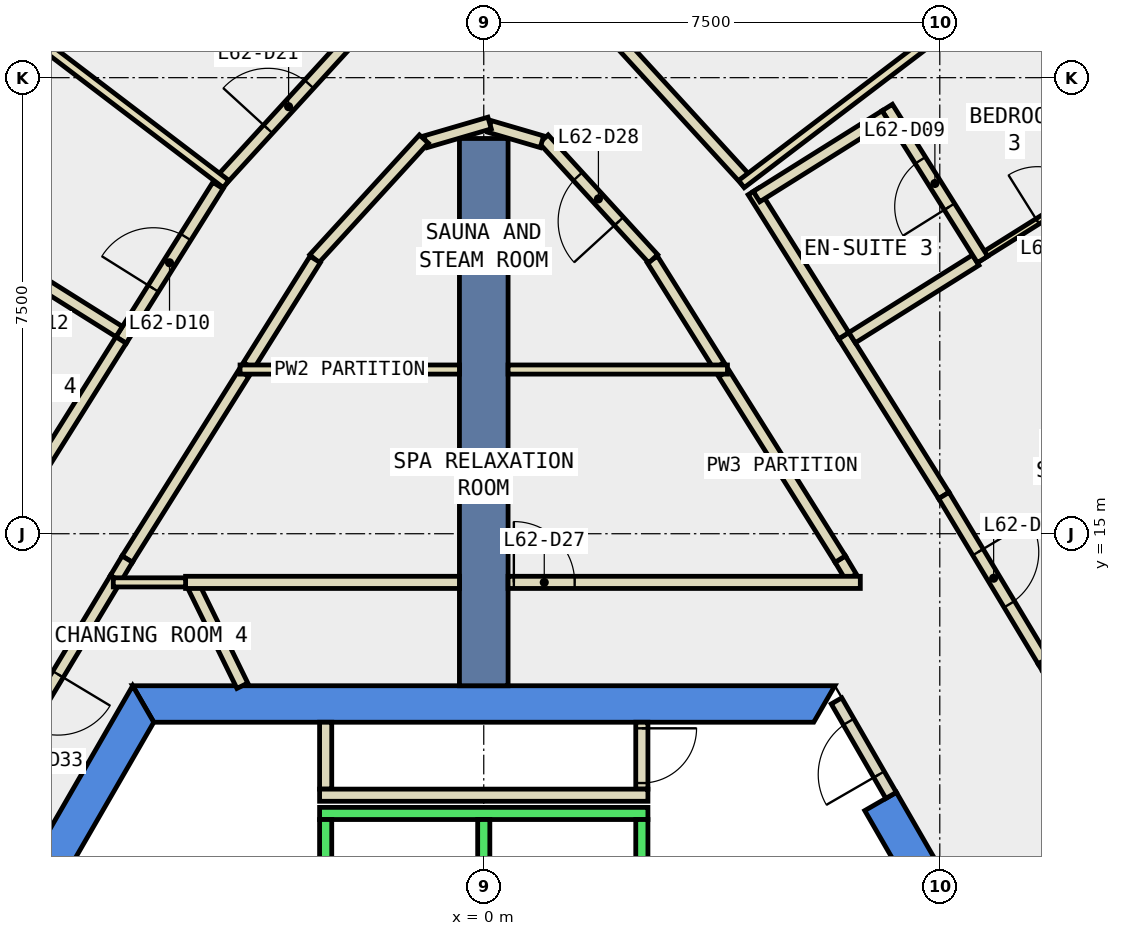
"""IFC4 building model, lengths in metres.
Left out: names, types, materials, properties, quantities, classifications, styles, units other than length and angle.
Written with IfcOpenShell. Run it as: python <this file> out.ifc"""

import sys

from ifc_helpers import new_model, si_unit, direction, frame, frame_2d, origin, place, context, subcontext, project, spatial, polyline, rectangle, outline, extrude, element, fill, save


model = new_model("IFC4")
c1 = context("Model", 3, precision=1e-05, world=origin(), true_north=direction((0.0, 1.0)))
c2 = subcontext(c1, "Body", "Model", "MODEL_VIEW")
j1 = project(units=[si_unit("LENGTHUNIT", "METRE"), si_unit("PLANEANGLEUNIT", "RADIAN")], contexts=[c1])
p1 = place(None, origin())
s1 = spatial("IfcSite", under=j1, at=p1, CompositionType="ELEMENT")
p2 = place(p1, origin())
s2 = spatial("IfcBuilding", under=s1, at=p2, CompositionType="ELEMENT")
p3 = place(p2, frame((0.0, 0.0, 270.2)))
s3 = spatial("IfcBuildingStorey", under=s2, at=p3, CompositionType="ELEMENT", Elevation=270.2)
p4 = place(p3, frame((0.0, 0.0, -0.34)))
e1 = element("IfcWall", 1, at=p4, inside=s3, PredefinedType="SHEAR", context=c2, shape_type="SweptSolid", body=[
    extrude(outline(polyline([(6.786, 10.747), (6.266, 10.447), (10.854, 2.5), (11.547, 2.5), (6.786, 10.747)])), origin(), (0.0, 0.0, 1.0), 3.6),
])
p5 = place(p3, frame((0.0, 0.0, -0.34)))
e2 = element("IfcWall", 2, at=p5, inside=s3, PredefinedType="SHEAR", context=c2, shape_type="SweptSolid", body=[
    extrude(outline(polyline([(5.774, 12.5), (-5.774, 12.5), (-5.427, 11.9), (5.427, 11.9), (5.774, 12.5)])), origin(), (0.0, 0.0, 1.0), 3.6),
])
p6 = place(p3, frame((0.0, 0.0, -0.34)))
e3 = element("IfcWall", 3, at=p6, inside=s3, PredefinedType="SHEAR", context=c2, shape_type="SweptSolid", body=[
    extrude(outline(polyline([(-10.535, 4.253), (-10.015, 3.953), (-5.427, 11.9), (-5.774, 12.5), (-10.535, 4.253)])), origin(), (0.0, 0.0, 1.0), 3.6),
])
p7 = place(p3, frame((0.0, 12.5, -0.34), z_axis=(0.0, 0.0, 1.0), x_axis=(0.0, 1.0, 0.0)))
e4 = element("IfcWall", 4, at=p7, inside=s3, PredefinedType="SHEAR", context=c2, shape_type="SweptSolid", body=[
    extrude(rectangle(XDim=9.0, YDim=0.8, at=frame_2d((4.5, 0.0))), origin(), (0.0, 0.0, 1.0), 3.6),
])
p8 = place(p3, frame((-3.97, 12.5, 0.0), z_axis=(0.0, 0.0, 1.0), x_axis=(-0.440355460167, 0.89782351757, 0.0)))
e5 = element("IfcWall", 5, at=p8, inside=s3, PredefinedType="PARTITIONING", context=c2, shape_type="SweptSolid", body=[
    extrude(rectangle(XDim=1.869, YDim=0.2, at=frame_2d((0.935, 0.0))), origin(), (0.0, 0.0, 1.0), 3.26),
])
p9 = place(p3, frame((-6.054, 14.264, 0.0), z_axis=(0.0, 0.0, 1.0), x_axis=(-0.515508653897, -0.856884372455, 0.0)))
e6 = element("IfcWall", 6, at=p9, inside=s3, PredefinedType="PARTITIONING", context=c2, shape_type="SweptSolid", body=[
    extrude(rectangle(XDim=4.677, YDim=0.2, at=frame_2d((2.339, 0.0))), origin(), (0.0, 0.0, 1.0), 3.26),
])
p10 = place(p9, frame((1.839, 0.0, 0.0)))
e7 = element("IfcOpeningElement", 7, at=p10, cuts=e6, PredefinedType="OPENING", context=c2, shape_type="SweptSolid", body=[
    extrude(rectangle(XDim=1.0, YDim=2.1, at=frame_2d((0.5, 1.05))), frame((0.0, 0.11, 0.0), z_axis=(0.0, -1.0, 0.0), x_axis=(1.0, 0.0, 0.0)), (0.0, 0.0, 1.0), 0.22),
])
p11 = place(p3, frame((-4.904, 14.2, 0.0), z_axis=(0.0, 0.0, 1.0), x_axis=(1.0, 0.0, 0.0)))
e8 = element("IfcWall", 8, at=p11, inside=s3, PredefinedType="PARTITIONING", context=c2, shape_type="SweptSolid", body=[
    extrude(rectangle(XDim=4.504, YDim=0.2, at=frame_2d((2.252, 0.0))), origin(), (0.0, 0.0, 1.0), 3.26),
])
p12 = place(p3, frame((6.041, 14.286, 0.0), z_axis=(0.0, 0.0, 1.0), x_axis=(-0.513873647624, 0.857865883619, 0.0)))
e9 = element("IfcWall", 9, at=p12, inside=s3, PredefinedType="PARTITIONING", context=c2, shape_type="SweptSolid", body=[
    extrude(rectangle(XDim=0.346, YDim=0.2, at=frame_2d((0.173, 0.0))), origin(), (0.0, 0.0, 1.0), 3.26),
])
for number, where, z_axis, x_axis in (
    (10, (5.863, 14.583, 0.0), (0.0, 0.0, 1.0), (-0.531, 0.847, 0.0)),
    (11, (-3.948, 17.636, 0.0), (0.0, 0.0, 1.0), (-0.531, -0.847, 0.0)),
):
    element("IfcWall", number, at=place(p3, frame(where, z_axis=z_axis, x_axis=x_axis)), inside=s3, PredefinedType="PARTITIONING", context=c2, shape_type="SweptSolid", body=[
        extrude(rectangle(XDim=3.604, YDim=0.2, at=frame_2d((1.802, 0.0))), origin(), (0.0, 0.0, 1.0), 3.26),
    ])
p13 = place(p3, frame((-5.863, 14.583, 0.0), z_axis=(0.0, 0.0, 1.0), x_axis=(-0.513433271491, -0.858129521533, 0.0)))
e12 = element("IfcWall", 12, at=p13, inside=s3, PredefinedType="PARTITIONING", context=c2, shape_type="SweptSolid", body=[
    extrude(rectangle(XDim=0.372, YDim=0.2, at=frame_2d((0.186, 0.0))), origin(), (0.0, 0.0, 1.0), 3.26),
])
p14 = place(p3, frame((3.868, 17.764, 0.0), z_axis=(0.0, 0.0, 1.0), x_axis=(-0.531062870102, 0.847332418829, 0.0)))
e13 = element("IfcWall", 13, at=p14, inside=s3, PredefinedType="PARTITIONING", context=c2, shape_type="SweptSolid", body=[
    extrude(rectangle(XDim=2.062, YDim=0.2, at=frame_2d((1.031, 0.0))), origin(), (0.0, 0.0, 1.0), 3.26),
])
p15 = place(p3, frame((2.787, 19.522, 0.0), z_axis=(0.0, 0.0, 1.0), x_axis=(-0.675132105979, 0.73769684795, 0.0)))
e14 = element("IfcWall", 14, at=p15, inside=s3, PredefinedType="PARTITIONING", context=c2, shape_type="SweptSolid", body=[
    extrude(rectangle(XDim=2.669, YDim=0.2, at=frame_2d((1.334, 0.0))), origin(), (0.0, 0.0, 1.0), 3.26),
])
p16 = place(p15, frame((0.835, 0.0, 0.0)))
e15 = element("IfcOpeningElement", 15, at=p16, cuts=e14, PredefinedType="OPENING", context=c2, shape_type="SweptSolid", body=[
    extrude(rectangle(XDim=1.0, YDim=2.1, at=frame_2d((0.5, 1.05))), frame((0.0, 0.11, 0.0), z_axis=(0.0, -1.0, 0.0), x_axis=(1.0, 0.0, 0.0)), (0.0, 0.0, 1.0), 0.22),
])
p17 = place(p3, frame((0.957, 21.446, 0.0), z_axis=(0.0, 0.0, 1.0), x_axis=(-0.959758875404, 0.28082539252, 0.0)))
e16 = element("IfcWall", 16, at=p17, inside=s3, PredefinedType="PARTITIONING", context=c2, shape_type="SweptSolid", body=[
    extrude(rectangle(XDim=0.897, YDim=0.2, at=frame_2d((0.449, 0.0))), origin(), (0.0, 0.0, 1.0), 3.26),
])
p18 = place(p3, frame((0.096, 21.754, 0.0), z_axis=(0.0, 0.0, 1.0), x_axis=(-0.959817848073, -0.280623766849, 0.0)))
e17 = element("IfcWall", 17, at=p18, inside=s3, PredefinedType="PARTITIONING", context=c2, shape_type="SweptSolid", body=[
    extrude(rectangle(XDim=1.097, YDim=0.2, at=frame_2d((0.549, 0.0))), origin(), (0.0, 0.0, 1.0), 3.26),
])
p19 = place(p3, frame((-0.985, 21.491, 0.0), z_axis=(0.0, 0.0, 1.0), x_axis=(-0.675132105979, -0.73769684795, 0.0)))
e18 = element("IfcWall", 18, at=p19, inside=s3, PredefinedType="PARTITIONING", context=c2, shape_type="SweptSolid", body=[
    extrude(rectangle(XDim=2.669, YDim=0.2, at=frame_2d((1.334, 0.0))), origin(), (0.0, 0.0, 1.0), 3.26),
])
p20 = place(p3, frame((-2.773, 19.511, 0.0), z_axis=(0.0, 0.0, 1.0), x_axis=(-0.531062870102, -0.847332418829, 0.0)))
e19 = element("IfcWall", 19, at=p20, inside=s3, PredefinedType="PARTITIONING", context=c2, shape_type="SweptSolid", body=[
    extrude(rectangle(XDim=2.062, YDim=0.2, at=frame_2d((1.031, 0.0))), origin(), (0.0, 0.0, 1.0), 3.26),
])
p21 = place(p3, frame((5.92, 18.256, 0.0), z_axis=(0.0, 0.0, 1.0), x_axis=(0.531152062518, -0.84727651123, 0.0)))
e20 = element("IfcWall", 20, at=p21, inside=s3, PredefinedType="PARTITIONING", context=c2, shape_type="SweptSolid", body=[
    extrude(rectangle(XDim=3.101, YDim=0.2, at=frame_2d((1.55, 0.0))), origin(), (0.0, 0.0, 1.0), 3.26),
])
p22 = place(p3, frame((7.567, 15.629, 0.0), z_axis=(0.0, 0.0, 1.0), x_axis=(0.51556943596, -0.856847802532, 0.0)))
e21 = element("IfcWall", 21, at=p22, inside=s3, PredefinedType="PARTITIONING", context=c2, shape_type="SweptSolid", body=[
    extrude(rectangle(XDim=3.176, YDim=0.2, at=frame_2d((1.588, 0.0))), origin(), (0.0, 0.0, 1.0), 3.26),
])
p23 = place(p22, frame((1.088, 0.0, 0.0)))
e22 = element("IfcOpeningElement", 22, at=p23, cuts=e21, PredefinedType="OPENING", context=c2, shape_type="SweptSolid", body=[
    extrude(rectangle(XDim=1.0, YDim=2.1, at=frame_2d((0.5, 1.05))), frame((0.0, 0.11, 0.0), z_axis=(0.0, -1.0, 0.0), x_axis=(1.0, 0.0, 0.0)), (0.0, 0.0, 1.0), 0.22),
])
p24 = place(p3, frame((4.433, 20.628, 0.0), z_axis=(0.0, 0.0, 1.0), x_axis=(0.531135189756, -0.84728708842, 0.0)))
e23 = element("IfcWall", 23, at=p24, inside=s3, PredefinedType="PARTITIONING", context=c2, shape_type="SweptSolid", body=[
    extrude(rectangle(XDim=2.799, YDim=0.2, at=frame_2d((1.4, 0.0))), origin(), (0.0, 0.0, 1.0), 3.26),
])
p25 = place(p3, frame((-4.335, 20.793, 0.0), z_axis=(0.0, 0.0, 1.0), x_axis=(0.675074517272, 0.737749548377, 0.0)))
e24 = element("IfcWall", 24, at=p25, inside=s3, PredefinedType="PARTITIONING", context=c2, shape_type="SweptSolid", body=[
    extrude(rectangle(XDim=3.334, YDim=0.2, at=frame_2d((1.667, 0.0))), origin(), (0.0, 0.0, 1.0), 3.26),
])
p26 = place(p25, frame((1.167, 0.0, 0.0)))
e25 = element("IfcOpeningElement", 25, at=p26, cuts=e24, PredefinedType="OPENING", context=c2, shape_type="SweptSolid", body=[
    extrude(rectangle(XDim=1.0, YDim=2.1, at=frame_2d((0.5, 1.05))), frame((0.0, 0.11, 0.0), z_axis=(0.0, -1.0, 0.0), x_axis=(1.0, 0.0, 0.0)), (0.0, 0.0, 1.0), 0.22),
])
p27 = place(p3, frame((2.084, 23.253, 0.0), z_axis=(0.0, 0.0, 1.0), x_axis=(0.675074517272, -0.737749548377, 0.0)))
e26 = element("IfcWall", 26, at=p27, inside=s3, PredefinedType="PARTITIONING", context=c2, shape_type="SweptSolid", body=[
    extrude(rectangle(XDim=3.334, YDim=0.2, at=frame_2d((1.667, 0.0))), origin(), (0.0, 0.0, 1.0), 3.26),
])
p28 = place(p3, frame((-5.965, 18.185, 0.0), z_axis=(0.0, 0.0, 1.0), x_axis=(0.531256372055, 0.847211111324, 0.0)))
e27 = element("IfcWall", 27, at=p28, inside=s3, PredefinedType="PARTITIONING", context=c2, shape_type="SweptSolid", body=[
    extrude(rectangle(XDim=3.0, YDim=0.2, at=frame_2d((1.5, 0.0))), origin(), (0.0, 0.0, 1.0), 3.26),
])
p29 = place(p28, frame((1.0, 0.0, 0.0)))
e28 = element("IfcOpeningElement", 28, at=p29, cuts=e27, PredefinedType="OPENING", context=c2, shape_type="SweptSolid", body=[
    extrude(rectangle(XDim=1.0, YDim=2.1, at=frame_2d((0.5, 1.05))), frame((0.0, 0.11, 0.0), z_axis=(0.0, -1.0, 0.0), x_axis=(1.0, 0.0, 0.0)), (0.0, 0.0, 1.0), 0.22),
])
p30 = place(p3, frame((-7.452, 15.813, 0.0), z_axis=(0.0, 0.0, 1.0), x_axis=(0.531095943551, 0.847311689252, 0.0)))
e29 = element("IfcWall", 29, at=p30, inside=s3, PredefinedType="PARTITIONING", context=c2, shape_type="SweptSolid", body=[
    extrude(rectangle(XDim=2.8, YDim=0.2, at=frame_2d((1.4, 0.0))), origin(), (0.0, 0.0, 1.0), 3.26),
])
p31 = place(p3, frame((-2.6, 10.8, 0.0), z_axis=(0.0, 0.0, 1.0), x_axis=(0.0, 1.0, 0.0)))
e30 = element("IfcWall", 30, at=p31, inside=s3, PredefinedType="PARTITIONING", context=c2, shape_type="SweptSolid", body=[
    extrude(rectangle(XDim=1.1, YDim=0.2, at=frame_2d((0.55, 0.0))), origin(), (0.0, 0.0, 1.0), 3.26),
])
p32 = place(p3, frame((2.6, 11.9, 0.0), z_axis=(0.0, 0.0, 1.0), x_axis=(0.0, -1.0, 0.0)))
e31 = element("IfcWall", 31, at=p32, inside=s3, PredefinedType="PARTITIONING", context=c2, shape_type="SweptSolid", body=[
    extrude(rectangle(XDim=1.1, YDim=0.2, at=frame_2d((0.55, 0.0))), origin(), (0.0, 0.0, 1.0), 3.26),
])
p33 = place(p32, frame((0.1, 0.0, 0.0)))
e32 = element("IfcOpeningElement", 32, at=p33, cuts=e31, PredefinedType="OPENING", context=c2, shape_type="SweptSolid", body=[
    extrude(rectangle(XDim=0.9, YDim=2.1, at=frame_2d((0.45, 1.05))), frame((0.0, 0.11, 0.0), z_axis=(0.0, -1.0, 0.0), x_axis=(1.0, 0.0, 0.0)), (0.0, 0.0, 1.0), 0.22),
])
p34 = place(p3, frame((2.7, 10.7, 0.0), z_axis=(0.0, 0.0, 1.0), x_axis=(-1.0, 0.0, 0.0)))
e33 = element("IfcWall", 33, at=p34, inside=s3, PredefinedType="PARTITIONING", context=c2, shape_type="SweptSolid", body=[
    extrude(rectangle(XDim=5.4, YDim=0.2, at=frame_2d((2.7, 0.0))), origin(), (0.0, 0.0, 1.0), 3.26),
])
p35 = place(p3, frame((-4.904, 14.2, 0.0), z_axis=(0.0, 0.0, 1.0), x_axis=(-1.0, 0.0, 0.0)))
e34 = element("IfcWall", 34, at=p35, inside=s3, PredefinedType="PARTITIONING", context=c2, shape_type="SweptSolid", body=[
    extrude(rectangle(XDim=1.189, YDim=0.15, at=frame_2d((0.594, 0.0))), origin(), (0.0, 0.0, 1.0), 3.26),
])
p36 = place(p3, frame((-4.008, 17.7, 0.0), z_axis=(0.0, 0.0, 1.0), x_axis=(1.0, 0.0, 0.0)))
e35 = element("IfcWall", 35, at=p36, inside=s3, PredefinedType="PARTITIONING", context=c2, shape_type="SweptSolid", body=[
    extrude(rectangle(XDim=3.608, YDim=0.15, at=frame_2d((1.804, 0.0))), origin(), (0.0, 0.0, 1.0), 3.26),
])
p37 = place(p3, frame((9.157, 12.792, 0.0), z_axis=(0.0, 0.0, 1.0), x_axis=(0.856933793276, 0.515426497129, 0.0)))
e36 = element("IfcWall", 36, at=p37, inside=s3, PredefinedType="PARTITIONING", context=c2, shape_type="SweptSolid", body=[
    extrude(rectangle(XDim=5.9, YDim=0.15, at=frame_2d((2.95, 0.0))), origin(), (0.0, 0.0, 1.0), 3.26),
])
p38 = place(p3, frame((8.091, 19.499, 0.0), z_axis=(0.0, 0.0, 1.0), x_axis=(0.847249319986, 0.53119543464, 0.0)))
e37 = element("IfcWall", 37, at=p38, inside=s3, PredefinedType="PARTITIONING", context=c2, shape_type="SweptSolid", body=[
    extrude(rectangle(XDim=3.3, YDim=0.1, at=frame_2d((1.65, 0.0))), origin(), (0.0, 0.0, 1.0), 3.26),
])
p39 = place(p38, frame((1.2, 0.0, 0.0)))
e38 = element("IfcOpeningElement", 38, at=p39, cuts=e37, PredefinedType="OPENING", context=c2, shape_type="SweptSolid", body=[
    extrude(rectangle(XDim=0.9, YDim=2.1, at=frame_2d((0.45, 1.05))), frame((0.0, 0.06, 0.0), z_axis=(0.0, -1.0, 0.0), x_axis=(1.0, 0.0, 0.0)), (0.0, 0.0, 1.0), 0.12),
])
p40 = place(p3, frame((6.058, 18.224, 0.0), z_axis=(0.0, 0.0, 1.0), x_axis=(0.847191403331, 0.531287799711, 0.0)))
e39 = element("IfcWall", 39, at=p40, inside=s3, PredefinedType="PARTITIONING", context=c2, shape_type="SweptSolid", body=[
    extrude(rectangle(XDim=2.4, YDim=0.2, at=frame_2d((1.2, 0.0))), origin(), (0.0, 0.0, 1.0), 3.26),
])
p41 = place(p3, frame((8.203, 19.51, 0.0), z_axis=(0.0, 0.0, 1.0), x_axis=(-0.531218552952, 0.847234825181, 0.0)))
e40 = element("IfcWall", 40, at=p41, inside=s3, PredefinedType="PARTITIONING", context=c2, shape_type="SweptSolid", body=[
    extrude(rectangle(XDim=2.95, YDim=0.2, at=frame_2d((1.475, 0.0))), origin(), (0.0, 0.0, 1.0), 3.26),
])
p42 = place(p41, frame((1.025, 0.0, 0.0)))
e41 = element("IfcOpeningElement", 41, at=p42, cuts=e40, PredefinedType="OPENING", context=c2, shape_type="SweptSolid", body=[
    extrude(rectangle(XDim=0.9, YDim=2.1, at=frame_2d((0.45, 1.05))), frame((0.0, 0.11, 0.0), z_axis=(0.0, -1.0, 0.0), x_axis=(1.0, 0.0, 0.0)), (0.0, 0.0, 1.0), 0.22),
])
p43 = place(p3, frame((6.604, 21.871, 0.0), z_axis=(0.0, 0.0, 1.0), x_axis=(-0.847377617561, -0.530990746866, 0.0)))
e42 = element("IfcWall", 42, at=p43, inside=s3, PredefinedType="PARTITIONING", context=c2, shape_type="SweptSolid", body=[
    extrude(rectangle(XDim=2.499, YDim=0.2, at=frame_2d((1.25, 0.0))), origin(), (0.0, 0.0, 1.0), 3.26),
])
for number, where, z_axis, x_axis in (
    (43, (4.238, 20.751, 0.0), (0.0, 0.0, 1.0), (0.796, 0.606, 0.0)),
    (44, (-4.238, 20.751, 0.0), (0.0, 0.0, 1.0), (-0.796, 0.606, 0.0)),
):
    element("IfcWall", number, at=place(p3, frame(where, z_axis=z_axis, x_axis=x_axis)), inside=s3, PredefinedType="PARTITIONING", context=c2, shape_type="SweptSolid", body=[
        extrude(rectangle(XDim=4.604, YDim=0.15, at=frame_2d((2.302, 0.0))), origin(), (0.0, 0.0, 1.0), 3.26),
    ])
p44 = place(p3, frame((-5.996, 18.323, 0.0), z_axis=(0.0, 0.0, 1.0), x_axis=(-0.847191403331, 0.531287799711, 0.0)))
e45 = element("IfcWall", 45, at=p44, inside=s3, PredefinedType="PARTITIONING", context=c2, shape_type="SweptSolid", body=[
    extrude(rectangle(XDim=2.4, YDim=0.2, at=frame_2d((1.2, 0.0))), origin(), (0.0, 0.0, 1.0), 3.26),
])
p45 = place(p3, frame((6.699, 10.697, 0.0), z_axis=(0.0, 0.0, 1.0), x_axis=(-0.499914839587, 0.866074565589, 0.0)))
e46 = element("IfcWall", 46, at=p45, inside=s3, PredefinedType="PARTITIONING", context=c2, shape_type="SweptSolid", body=[
    extrude(rectangle(XDim=1.794, YDim=0.2, at=frame_2d((0.897, 0.0))), origin(), (0.0, 0.0, 1.0), 2.4),
])
p46 = place(p45, frame((0.397, 0.0, 0.0)))
e47 = element("IfcOpeningElement", 47, at=p46, cuts=e46, PredefinedType="OPENING", context=c2, shape_type="SweptSolid", body=[
    extrude(rectangle(XDim=1.0, YDim=2.1, at=frame_2d((0.5, 1.05))), frame((0.0, 0.11, 0.0), z_axis=(0.0, -1.0, 0.0), x_axis=(1.0, 0.0, 0.0)), (0.0, 0.0, 1.0), 0.22),
])
p47 = place(p3, frame((0.4, 14.2, 0.0), z_axis=(0.0, 0.0, 1.0), x_axis=(1.0, 0.0, 0.0)))
e48 = element("IfcWall", 48, at=p47, inside=s3, PredefinedType="PARTITIONING", context=c2, shape_type="SweptSolid", body=[
    extrude(rectangle(XDim=5.793, YDim=0.2, at=frame_2d((2.896, 0.0))), origin(), (0.0, 0.0, 1.0), 3.26),
])
p48 = place(p47, frame((0.095, 0.0, 0.0)))
e49 = element("IfcOpeningElement", 49, at=p48, cuts=e48, PredefinedType="OPENING", context=c2, shape_type="SweptSolid", body=[
    extrude(rectangle(XDim=1.0, YDim=2.1, at=frame_2d((0.5, 1.05))), frame((0.0, 0.11, 0.0), z_axis=(0.0, -1.0, 0.0), x_axis=(1.0, 0.0, 0.0)), (0.0, 0.0, 1.0), 0.22),
])
p49 = place(p3, frame((0.4, 17.7, 0.0), z_axis=(0.0, 0.0, 1.0), x_axis=(1.0, 0.0, 0.0)))
e50 = element("IfcWall", 50, at=p49, inside=s3, PredefinedType="PARTITIONING", context=c2, shape_type="SweptSolid", body=[
    extrude(rectangle(XDim=3.608, YDim=0.15, at=frame_2d((1.804, 0.0))), origin(), (0.0, 0.0, 1.0), 3.26),
])
p50 = place(p3, frame((2.7, 10.4, 0.0), z_axis=(0.0, 0.0, 1.0), x_axis=(-1.0, 0.0, 0.0)))
e51 = element("IfcWall", 51, at=p50, inside=s3, PredefinedType="STANDARD", context=c2, shape_type="SweptSolid", body=[
    extrude(rectangle(XDim=5.4, YDim=0.2, at=frame_2d((2.7, 0.0))), origin(), (0.0, 0.0, 1.0), 3.26),
])
for number, where, z_axis, x_axis in (
    (52, (2.6, 7.9, 0.0), (0.0, 0.0, 1.0), (0.0, 1.0, 0.0)),
    (53, (0.0, 7.9, 0.0), (0.0, 0.0, 1.0), (0.0, 1.0, 0.0)),
    (54, (-2.6, 7.9, 0.0), (0.0, 0.0, 1.0), (0.0, 1.0, 0.0)),
):
    element("IfcWall", number, at=place(p3, frame(where, z_axis=z_axis, x_axis=x_axis)), inside=s3, PredefinedType="STANDARD", context=c2, shape_type="SweptSolid", body=[
        extrude(rectangle(XDim=2.4, YDim=0.2, at=frame_2d((1.2, 0.0))), origin(), (0.0, 0.0, 1.0), 3.26),
    ])
p51 = place(p23, origin())
e55 = element("IfcDoor", 55, at=p51, inside=s3, OperationType="SINGLE_SWING_RIGHT", PredefinedType="DOOR", context=c2, shape_type="SweptSolid", body=[
    extrude(rectangle(XDim=1.0, YDim=2.1, at=frame_2d((0.5, 1.05))), frame((0.0, 0.025, 0.0), z_axis=(0.0, -1.0, 0.0), x_axis=(1.0, 0.0, 0.0)), (0.0, 0.0, 1.0), 0.05),
])
fill(e22, e55)
p52 = place(p39, origin())
e56 = element("IfcDoor", 56, at=p52, inside=s3, OperationType="SINGLE_SWING_LEFT", PredefinedType="DOOR", context=c2, shape_type="SweptSolid", body=[
    extrude(rectangle(XDim=0.9, YDim=2.1, at=frame_2d((0.45, 1.05))), frame((0.0, 0.025, 0.0), z_axis=(0.0, -1.0, 0.0), x_axis=(1.0, 0.0, 0.0)), (0.0, 0.0, 1.0), 0.05),
])
fill(e38, e56)
p53 = place(p42, origin())
e57 = element("IfcDoor", 57, at=p53, inside=s3, OperationType="SINGLE_SWING_RIGHT", PredefinedType="DOOR", context=c2, shape_type="SweptSolid", body=[
    extrude(rectangle(XDim=0.9, YDim=2.1, at=frame_2d((0.45, 1.05))), frame((0.0, 0.025, 0.0), z_axis=(0.0, -1.0, 0.0), x_axis=(1.0, 0.0, 0.0)), (0.0, 0.0, 1.0), 0.05),
])
fill(e41, e57)
p54 = place(p29, origin())
e58 = element("IfcDoor", 58, at=p54, inside=s3, OperationType="SINGLE_SWING_LEFT", PredefinedType="DOOR", context=c2, shape_type="SweptSolid", body=[
    extrude(rectangle(XDim=1.0, YDim=2.1, at=frame_2d((0.5, 1.05))), frame((0.0, 0.025, 0.0), z_axis=(0.0, -1.0, 0.0), x_axis=(1.0, 0.0, 0.0)), (0.0, 0.0, 1.0), 0.05),
])
fill(e28, e58)
p55 = place(p26, origin())
e59 = element("IfcDoor", 59, at=p55, inside=s3, OperationType="SINGLE_SWING_LEFT", PredefinedType="DOOR", context=c2, shape_type="SweptSolid", body=[
    extrude(rectangle(XDim=1.0, YDim=2.1, at=frame_2d((0.5, 1.05))), frame((0.0, 0.025, 0.0), z_axis=(0.0, -1.0, 0.0), x_axis=(1.0, 0.0, 0.0)), (0.0, 0.0, 1.0), 0.05),
])
fill(e25, e59)
p56 = place(p48, origin())
e60 = element("IfcDoor", 60, at=p56, inside=s3, OperationType="SINGLE_SWING_LEFT", PredefinedType="DOOR", context=c2, shape_type="SweptSolid", body=[
    extrude(rectangle(XDim=1.0, YDim=2.1, at=frame_2d((0.5, 1.05))), frame((0.0, 0.025, 0.0), z_axis=(0.0, -1.0, 0.0), x_axis=(1.0, 0.0, 0.0)), (0.0, 0.0, 1.0), 0.05),
])
fill(e49, e60)
p57 = place(p16, origin())
e61 = element("IfcDoor", 61, at=p57, inside=s3, OperationType="SINGLE_SWING_LEFT", PredefinedType="DOOR", context=c2, shape_type="SweptSolid", body=[
    extrude(rectangle(XDim=1.0, YDim=2.1, at=frame_2d((0.5, 1.05))), frame((0.0, 0.025, 0.0), z_axis=(0.0, -1.0, 0.0), x_axis=(1.0, 0.0, 0.0)), (0.0, 0.0, 1.0), 0.05),
])
fill(e15, e61)
p58 = place(p10, origin())
e62 = element("IfcDoor", 62, at=p58, inside=s3, OperationType="SINGLE_SWING_LEFT", PredefinedType="DOOR", context=c2, shape_type="SweptSolid", body=[
    extrude(rectangle(XDim=1.0, YDim=2.1, at=frame_2d((0.5, 1.05))), frame((0.0, 0.025, 0.0), z_axis=(0.0, -1.0, 0.0), x_axis=(1.0, 0.0, 0.0)), (0.0, 0.0, 1.0), 0.05),
])
fill(e7, e62)
p59 = place(p33, origin())
e63 = element("IfcDoor", 63, at=p59, inside=s3, OperationType="SINGLE_SWING_LEFT", PredefinedType="DOOR", context=c2, shape_type="SweptSolid", body=[
    extrude(rectangle(XDim=0.9, YDim=2.1, at=frame_2d((0.45, 1.05))), frame((0.0, 0.025, 0.0), z_axis=(0.0, -1.0, 0.0), x_axis=(1.0, 0.0, 0.0)), (0.0, 0.0, 1.0), 0.05),
])
fill(e32, e63)
p60 = place(p46, origin())
e64 = element("IfcDoor", 64, at=p60, inside=s3, OperationType="SINGLE_SWING_LEFT", PredefinedType="DOOR", context=c2, shape_type="SweptSolid", body=[
    extrude(rectangle(XDim=1.0, YDim=2.1, at=frame_2d((0.5, 1.05))), frame((0.0, 0.025, 0.0), z_axis=(0.0, -1.0, 0.0), x_axis=(1.0, 0.0, 0.0)), (0.0, 0.0, 1.0), 0.05),
])
fill(e47, e64)
save(model, sys.argv[1])
